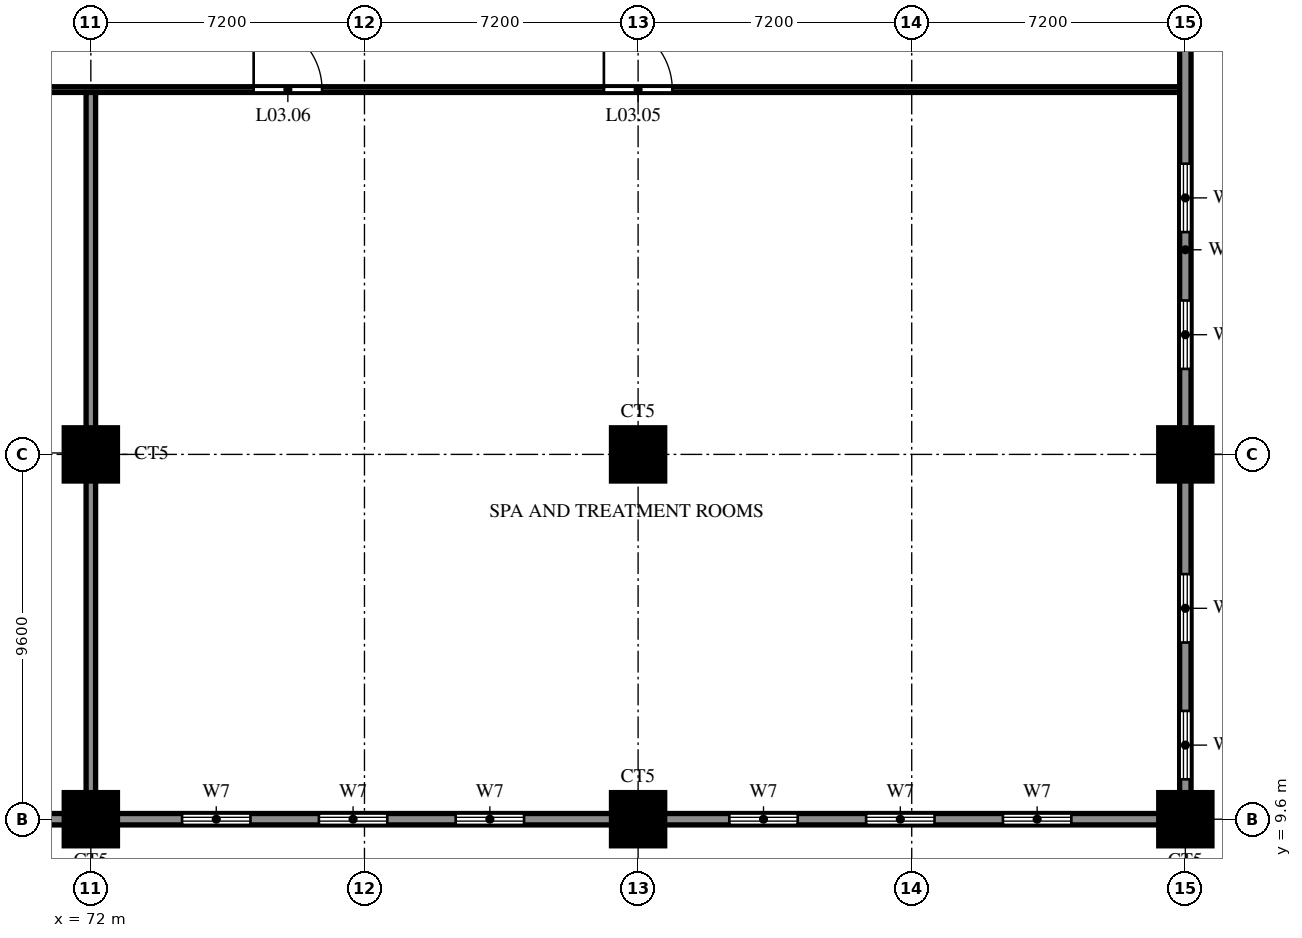
"""IFC4 building model, lengths in metres.
Left out: names, types, materials, properties, quantities, classifications, styles, units other than length and angle.
Written with IfcOpenShell. Run it as: python <this file> out.ifc"""

import sys

from ifc_helpers import new_model, si_unit, direction, frame, frame_2d, origin, origin_2d, place, context, subcontext, project, spatial, rectangle, circle, extrude, source, transform, mapped, element, fill, save


model = new_model("IFC4")
c1 = context("Model", 3, precision=1e-05, world=origin(), true_north=direction((0.0, 1.0)))
c2 = subcontext(c1, "Body", "Model", "MODEL_VIEW")
j1 = project(units=[si_unit("LENGTHUNIT", "METRE"), si_unit("PLANEANGLEUNIT", "RADIAN")], contexts=[c1])
p1 = place(None, origin())
s1 = spatial("IfcSite", under=j1, at=p1, CompositionType="ELEMENT")
p2 = place(p1, origin())
s2 = spatial("IfcBuilding", under=s1, at=p2, CompositionType="ELEMENT")
p3 = place(p2, frame((0.0, 0.0, 17.4)))
s3 = spatial("IfcBuildingStorey", under=s2, at=p3, CompositionType="ELEMENT", Elevation=17.4)
m1 = source(origin(), c2, "Body", "SweptSolid", [
    extrude(circle(Radius=0.7, at=origin_2d()), origin(), (0.0, 0.0, 1.0), 3.8),
])
for number, where, z_axis, x_axis in (
    (1, (72.0, 9.6, 0.0), (0.0, 0.0, 1.0), (1.0, 0.0, 0.0)),
    (2, (86.4, 9.6, 0.0), (0.0, 0.0, 1.0), (1.0, 0.0, 0.0)),
    (3, (100.8, 9.6, 0.0), (0.0, 0.0, 1.0), (1.0, 0.0, 0.0)),
    (4, (72.0, 19.2, 0.0), (0.0, 0.0, 1.0), (1.0, 0.0, 0.0)),
    (5, (86.4, 19.2, 0.0), (0.0, 0.0, 1.0), (1.0, 0.0, 0.0)),
    (6, (100.8, 19.2, 0.0), (0.0, 0.0, 1.0), (1.0, 0.0, 0.0)),
):
    element("IfcColumn", number, at=place(p3, frame(where, z_axis=z_axis, x_axis=x_axis)), inside=s3, PredefinedType="COLUMN", context=c2, shape_type="MappedRepresentation", body=[
        mapped(m1, transform((0.0, 0.0, 0.0))),
    ])
p4 = place(p3, frame((0.0, 9.6, 0.0), z_axis=(0.0, 0.0, 1.0), x_axis=(1.0, 0.0, 0.0)))
e7 = element("IfcWall", 7, at=p4, inside=s3, PredefinedType="SOLIDWALL", context=c2, shape_type="SweptSolid", body=[
    extrude(rectangle(XDim=100.8, YDim=0.3, at=frame_2d((50.4, 0.0))), origin(), (0.0, 0.0, 1.0), 3.8),
])
p5 = place(p4, frame((2.4, 0.0, 0.6)))
e8 = element("IfcOpeningElement", 8, at=p5, cuts=e7, PredefinedType="OPENING", context=c2, shape_type="SweptSolid", body=[
    extrude(rectangle(XDim=1.8, YDim=2.4, at=frame_2d((0.9, 1.2))), frame((0.0, 0.16, 0.0), z_axis=(0.0, -1.0, 0.0), x_axis=(1.0, 0.0, 0.0)), (0.0, 0.0, 1.0), 0.32),
])
p6 = place(p4, frame((6.0, 0.0, 0.6)))
e9 = element("IfcOpeningElement", 9, at=p6, cuts=e7, PredefinedType="OPENING", context=c2, shape_type="SweptSolid", body=[
    extrude(rectangle(XDim=1.8, YDim=2.4, at=frame_2d((0.9, 1.2))), frame((0.0, 0.16, 0.0), z_axis=(0.0, -1.0, 0.0), x_axis=(1.0, 0.0, 0.0)), (0.0, 0.0, 1.0), 0.32),
])
p7 = place(p4, frame((9.6, 0.0, 0.6)))
e10 = element("IfcOpeningElement", 10, at=p7, cuts=e7, PredefinedType="OPENING", context=c2, shape_type="SweptSolid", body=[
    extrude(rectangle(XDim=1.8, YDim=2.4, at=frame_2d((0.9, 1.2))), frame((0.0, 0.16, 0.0), z_axis=(0.0, -1.0, 0.0), x_axis=(1.0, 0.0, 0.0)), (0.0, 0.0, 1.0), 0.32),
])
p8 = place(p4, frame((16.8, 0.0, 0.6)))
e11 = element("IfcOpeningElement", 11, at=p8, cuts=e7, PredefinedType="OPENING", context=c2, shape_type="SweptSolid", body=[
    extrude(rectangle(XDim=1.8, YDim=2.4, at=frame_2d((0.9, 1.2))), frame((0.0, 0.16, 0.0), z_axis=(0.0, -1.0, 0.0), x_axis=(1.0, 0.0, 0.0)), (0.0, 0.0, 1.0), 0.32),
])
p9 = place(p4, frame((20.4, 0.0, 0.6)))
e12 = element("IfcOpeningElement", 12, at=p9, cuts=e7, PredefinedType="OPENING", context=c2, shape_type="SweptSolid", body=[
    extrude(rectangle(XDim=1.8, YDim=2.4, at=frame_2d((0.9, 1.2))), frame((0.0, 0.16, 0.0), z_axis=(0.0, -1.0, 0.0), x_axis=(1.0, 0.0, 0.0)), (0.0, 0.0, 1.0), 0.32),
])
p10 = place(p4, frame((24.0, 0.0, 0.6)))
e13 = element("IfcOpeningElement", 13, at=p10, cuts=e7, PredefinedType="OPENING", context=c2, shape_type="SweptSolid", body=[
    extrude(rectangle(XDim=1.8, YDim=2.4, at=frame_2d((0.9, 1.2))), frame((0.0, 0.16, 0.0), z_axis=(0.0, -1.0, 0.0), x_axis=(1.0, 0.0, 0.0)), (0.0, 0.0, 1.0), 0.32),
])
p11 = place(p4, frame((31.2, 0.0, 0.6)))
e14 = element("IfcOpeningElement", 14, at=p11, cuts=e7, PredefinedType="OPENING", context=c2, shape_type="SweptSolid", body=[
    extrude(rectangle(XDim=1.8, YDim=2.4, at=frame_2d((0.9, 1.2))), frame((0.0, 0.16, 0.0), z_axis=(0.0, -1.0, 0.0), x_axis=(1.0, 0.0, 0.0)), (0.0, 0.0, 1.0), 0.32),
])
p12 = place(p4, frame((34.8, 0.0, 0.6)))
e15 = element("IfcOpeningElement", 15, at=p12, cuts=e7, PredefinedType="OPENING", context=c2, shape_type="SweptSolid", body=[
    extrude(rectangle(XDim=1.8, YDim=2.4, at=frame_2d((0.9, 1.2))), frame((0.0, 0.16, 0.0), z_axis=(0.0, -1.0, 0.0), x_axis=(1.0, 0.0, 0.0)), (0.0, 0.0, 1.0), 0.32),
])
p13 = place(p4, frame((38.4, 0.0, 0.6)))
e16 = element("IfcOpeningElement", 16, at=p13, cuts=e7, PredefinedType="OPENING", context=c2, shape_type="SweptSolid", body=[
    extrude(rectangle(XDim=1.8, YDim=2.4, at=frame_2d((0.9, 1.2))), frame((0.0, 0.16, 0.0), z_axis=(0.0, -1.0, 0.0), x_axis=(1.0, 0.0, 0.0)), (0.0, 0.0, 1.0), 0.32),
])
p14 = place(p4, frame((45.6, 0.0, 0.6)))
e17 = element("IfcOpeningElement", 17, at=p14, cuts=e7, PredefinedType="OPENING", context=c2, shape_type="SweptSolid", body=[
    extrude(rectangle(XDim=1.8, YDim=2.4, at=frame_2d((0.9, 1.2))), frame((0.0, 0.16, 0.0), z_axis=(0.0, -1.0, 0.0), x_axis=(1.0, 0.0, 0.0)), (0.0, 0.0, 1.0), 0.32),
])
p15 = place(p4, frame((49.2, 0.0, 0.6)))
e18 = element("IfcOpeningElement", 18, at=p15, cuts=e7, PredefinedType="OPENING", context=c2, shape_type="SweptSolid", body=[
    extrude(rectangle(XDim=1.8, YDim=2.4, at=frame_2d((0.9, 1.2))), frame((0.0, 0.16, 0.0), z_axis=(0.0, -1.0, 0.0), x_axis=(1.0, 0.0, 0.0)), (0.0, 0.0, 1.0), 0.32),
])
p16 = place(p4, frame((52.8, 0.0, 0.6)))
e19 = element("IfcOpeningElement", 19, at=p16, cuts=e7, PredefinedType="OPENING", context=c2, shape_type="SweptSolid", body=[
    extrude(rectangle(XDim=1.8, YDim=2.4, at=frame_2d((0.9, 1.2))), frame((0.0, 0.16, 0.0), z_axis=(0.0, -1.0, 0.0), x_axis=(1.0, 0.0, 0.0)), (0.0, 0.0, 1.0), 0.32),
])
p17 = place(p4, frame((60.0, 0.0, 0.6)))
e20 = element("IfcOpeningElement", 20, at=p17, cuts=e7, PredefinedType="OPENING", context=c2, shape_type="SweptSolid", body=[
    extrude(rectangle(XDim=1.8, YDim=2.4, at=frame_2d((0.9, 1.2))), frame((0.0, 0.16, 0.0), z_axis=(0.0, -1.0, 0.0), x_axis=(1.0, 0.0, 0.0)), (0.0, 0.0, 1.0), 0.32),
])
p18 = place(p4, frame((63.6, 0.0, 0.6)))
e21 = element("IfcOpeningElement", 21, at=p18, cuts=e7, PredefinedType="OPENING", context=c2, shape_type="SweptSolid", body=[
    extrude(rectangle(XDim=1.8, YDim=2.4, at=frame_2d((0.9, 1.2))), frame((0.0, 0.16, 0.0), z_axis=(0.0, -1.0, 0.0), x_axis=(1.0, 0.0, 0.0)), (0.0, 0.0, 1.0), 0.32),
])
p19 = place(p4, frame((67.2, 0.0, 0.6)))
e22 = element("IfcOpeningElement", 22, at=p19, cuts=e7, PredefinedType="OPENING", context=c2, shape_type="SweptSolid", body=[
    extrude(rectangle(XDim=1.8, YDim=2.4, at=frame_2d((0.9, 1.2))), frame((0.0, 0.16, 0.0), z_axis=(0.0, -1.0, 0.0), x_axis=(1.0, 0.0, 0.0)), (0.0, 0.0, 1.0), 0.32),
])
p20 = place(p4, frame((74.4, 0.0, 0.6)))
e23 = element("IfcOpeningElement", 23, at=p20, cuts=e7, PredefinedType="OPENING", context=c2, shape_type="SweptSolid", body=[
    extrude(rectangle(XDim=1.8, YDim=2.4, at=frame_2d((0.9, 1.2))), frame((0.0, 0.16, 0.0), z_axis=(0.0, -1.0, 0.0), x_axis=(1.0, 0.0, 0.0)), (0.0, 0.0, 1.0), 0.32),
])
p21 = place(p4, frame((78.0, 0.0, 0.6)))
e24 = element("IfcOpeningElement", 24, at=p21, cuts=e7, PredefinedType="OPENING", context=c2, shape_type="SweptSolid", body=[
    extrude(rectangle(XDim=1.8, YDim=2.4, at=frame_2d((0.9, 1.2))), frame((0.0, 0.16, 0.0), z_axis=(0.0, -1.0, 0.0), x_axis=(1.0, 0.0, 0.0)), (0.0, 0.0, 1.0), 0.32),
])
p22 = place(p4, frame((81.6, 0.0, 0.6)))
e25 = element("IfcOpeningElement", 25, at=p22, cuts=e7, PredefinedType="OPENING", context=c2, shape_type="SweptSolid", body=[
    extrude(rectangle(XDim=1.8, YDim=2.4, at=frame_2d((0.9, 1.2))), frame((0.0, 0.16, 0.0), z_axis=(0.0, -1.0, 0.0), x_axis=(1.0, 0.0, 0.0)), (0.0, 0.0, 1.0), 0.32),
])
p23 = place(p4, frame((88.8, 0.0, 0.6)))
e26 = element("IfcOpeningElement", 26, at=p23, cuts=e7, PredefinedType="OPENING", context=c2, shape_type="SweptSolid", body=[
    extrude(rectangle(XDim=1.8, YDim=2.4, at=frame_2d((0.9, 1.2))), frame((0.0, 0.16, 0.0), z_axis=(0.0, -1.0, 0.0), x_axis=(1.0, 0.0, 0.0)), (0.0, 0.0, 1.0), 0.32),
])
p24 = place(p4, frame((92.4, 0.0, 0.6)))
e27 = element("IfcOpeningElement", 27, at=p24, cuts=e7, PredefinedType="OPENING", context=c2, shape_type="SweptSolid", body=[
    extrude(rectangle(XDim=1.8, YDim=2.4, at=frame_2d((0.9, 1.2))), frame((0.0, 0.16, 0.0), z_axis=(0.0, -1.0, 0.0), x_axis=(1.0, 0.0, 0.0)), (0.0, 0.0, 1.0), 0.32),
])
p25 = place(p4, frame((96.0, 0.0, 0.6)))
e28 = element("IfcOpeningElement", 28, at=p25, cuts=e7, PredefinedType="OPENING", context=c2, shape_type="SweptSolid", body=[
    extrude(rectangle(XDim=1.8, YDim=2.4, at=frame_2d((0.9, 1.2))), frame((0.0, 0.16, 0.0), z_axis=(0.0, -1.0, 0.0), x_axis=(1.0, 0.0, 0.0)), (0.0, 0.0, 1.0), 0.32),
])
p26 = place(p3, frame((0.15, 28.8, 0.0), z_axis=(0.0, 0.0, 1.0), x_axis=(1.0, 0.0, 0.0)))
e29 = element("IfcWall", 29, at=p26, inside=s3, PredefinedType="PARTITIONING", context=c2, shape_type="SweptSolid", body=[
    extrude(rectangle(XDim=100.5, YDim=0.15, at=frame_2d((50.25, 0.0))), origin(), (0.0, 0.0, 1.0), 2.6),
])
p27 = place(p26, frame((13.35, 0.0, 0.0)))
e30 = element("IfcOpeningElement", 30, at=p27, cuts=e29, PredefinedType="OPENING", context=c2, shape_type="SweptSolid", body=[
    extrude(rectangle(XDim=1.8, YDim=2.1, at=frame_2d((0.9, 1.05))), frame((0.0, 0.085, 0.0), z_axis=(0.0, -1.0, 0.0), x_axis=(1.0, 0.0, 0.0)), (0.0, 0.0, 1.0), 0.17),
])
p28 = place(p26, frame((4.134, 0.0, 0.0)))
e31 = element("IfcOpeningElement", 31, at=p28, cuts=e29, PredefinedType="OPENING", context=c2, shape_type="SweptSolid", body=[
    extrude(rectangle(XDim=1.8, YDim=2.1, at=frame_2d((0.9, 1.05))), frame((0.0, 0.085, 0.0), z_axis=(0.0, -1.0, 0.0), x_axis=(1.0, 0.0, 0.0)), (0.0, 0.0, 1.0), 0.17),
])
p29 = place(p26, frame((49.35, 0.0, 0.0)))
e32 = element("IfcOpeningElement", 32, at=p29, cuts=e29, PredefinedType="OPENING", context=c2, shape_type="SweptSolid", body=[
    extrude(rectangle(XDim=1.8, YDim=2.1, at=frame_2d((0.9, 1.05))), frame((0.0, 0.085, 0.0), z_axis=(0.0, -1.0, 0.0), x_axis=(1.0, 0.0, 0.0)), (0.0, 0.0, 1.0), 0.17),
])
p30 = place(p26, frame((35.526, 0.0, 0.0)))
e33 = element("IfcOpeningElement", 33, at=p30, cuts=e29, PredefinedType="OPENING", context=c2, shape_type="SweptSolid", body=[
    extrude(rectangle(XDim=1.8, YDim=2.1, at=frame_2d((0.9, 1.05))), frame((0.0, 0.085, 0.0), z_axis=(0.0, -1.0, 0.0), x_axis=(1.0, 0.0, 0.0)), (0.0, 0.0, 1.0), 0.17),
])
p31 = place(p26, frame((85.35, 0.0, 0.0)))
e34 = element("IfcOpeningElement", 34, at=p31, cuts=e29, PredefinedType="OPENING", context=c2, shape_type="SweptSolid", body=[
    extrude(rectangle(XDim=1.8, YDim=2.1, at=frame_2d((0.9, 1.05))), frame((0.0, 0.085, 0.0), z_axis=(0.0, -1.0, 0.0), x_axis=(1.0, 0.0, 0.0)), (0.0, 0.0, 1.0), 0.17),
])
p32 = place(p26, frame((76.134, 0.0, 0.0)))
e35 = element("IfcOpeningElement", 35, at=p32, cuts=e29, PredefinedType="OPENING", context=c2, shape_type="SweptSolid", body=[
    extrude(rectangle(XDim=1.8, YDim=2.1, at=frame_2d((0.9, 1.05))), frame((0.0, 0.085, 0.0), z_axis=(0.0, -1.0, 0.0), x_axis=(1.0, 0.0, 0.0)), (0.0, 0.0, 1.0), 0.17),
])
p33 = place(p3, frame((72.0, 9.75, 0.0), z_axis=(0.0, 0.0, 1.0), x_axis=(0.0, 1.0, 0.0)))
e36 = element("IfcWall", 36, at=p33, inside=s3, PredefinedType="SOLIDWALL", context=c2, shape_type="SweptSolid", body=[
    extrude(rectangle(XDim=18.975, YDim=0.25, at=frame_2d((9.488, 0.0))), origin(), (0.0, 0.0, 1.0), 2.6),
])
p34 = place(p3, frame((100.8, 9.6, 0.0), z_axis=(0.0, 0.0, 1.0), x_axis=(0.0, 1.0, 0.0)))
e37 = element("IfcWall", 37, at=p34, inside=s3, PredefinedType="SOLIDWALL", context=c2, shape_type="SweptSolid", body=[
    extrude(rectangle(XDim=33.3, YDim=0.3, at=frame_2d((16.65, 0.0))), origin(), (0.0, 0.0, 1.0), 3.8),
])
p35 = place(p34, frame((1.05, 0.0, 0.6)))
e38 = element("IfcOpeningElement", 38, at=p35, cuts=e37, PredefinedType="OPENING", context=c2, shape_type="SweptSolid", body=[
    extrude(rectangle(XDim=1.8, YDim=2.4, at=frame_2d((0.9, 1.2))), frame((0.0, 0.16, 0.0), z_axis=(0.0, -1.0, 0.0), x_axis=(1.0, 0.0, 0.0)), (0.0, 0.0, 1.0), 0.32),
])
p36 = place(p34, frame((4.65, 0.0, 0.6)))
e39 = element("IfcOpeningElement", 39, at=p36, cuts=e37, PredefinedType="OPENING", context=c2, shape_type="SweptSolid", body=[
    extrude(rectangle(XDim=1.8, YDim=2.4, at=frame_2d((0.9, 1.2))), frame((0.0, 0.16, 0.0), z_axis=(0.0, -1.0, 0.0), x_axis=(1.0, 0.0, 0.0)), (0.0, 0.0, 1.0), 0.32),
])
p37 = place(p34, frame((11.85, 0.0, 0.6)))
e40 = element("IfcOpeningElement", 40, at=p37, cuts=e37, PredefinedType="OPENING", context=c2, shape_type="SweptSolid", body=[
    extrude(rectangle(XDim=1.8, YDim=2.4, at=frame_2d((0.9, 1.2))), frame((0.0, 0.16, 0.0), z_axis=(0.0, -1.0, 0.0), x_axis=(1.0, 0.0, 0.0)), (0.0, 0.0, 1.0), 0.32),
])
p38 = place(p34, frame((15.45, 0.0, 0.6)))
e41 = element("IfcOpeningElement", 41, at=p38, cuts=e37, PredefinedType="OPENING", context=c2, shape_type="SweptSolid", body=[
    extrude(rectangle(XDim=1.8, YDim=2.4, at=frame_2d((0.9, 1.2))), frame((0.0, 0.16, 0.0), z_axis=(0.0, -1.0, 0.0), x_axis=(1.0, 0.0, 0.0)), (0.0, 0.0, 1.0), 0.32),
])
p39 = place(p34, frame((26.25, 0.0, 0.6)))
e42 = element("IfcOpeningElement", 42, at=p39, cuts=e37, PredefinedType="OPENING", context=c2, shape_type="SweptSolid", body=[
    extrude(rectangle(XDim=1.8, YDim=2.4, at=frame_2d((0.9, 1.2))), frame((0.0, 0.16, 0.0), z_axis=(0.0, -1.0, 0.0), x_axis=(1.0, 0.0, 0.0)), (0.0, 0.0, 1.0), 0.32),
])
p40 = place(p34, frame((29.85, 0.0, 0.6)))
e43 = element("IfcOpeningElement", 43, at=p40, cuts=e37, PredefinedType="OPENING", context=c2, shape_type="SweptSolid", body=[
    extrude(rectangle(XDim=1.8, YDim=2.4, at=frame_2d((0.9, 1.2))), frame((0.0, 0.16, 0.0), z_axis=(0.0, -1.0, 0.0), x_axis=(1.0, 0.0, 0.0)), (0.0, 0.0, 1.0), 0.32),
])
p41 = place(p31, origin())
e44 = element("IfcDoor", 44, at=p41, inside=s3, OperationType="DOUBLE_DOOR_SINGLE_SWING", PredefinedType="DOOR", context=c2, shape_type="SweptSolid", body=[
    extrude(rectangle(XDim=1.8, YDim=2.1, at=frame_2d((0.9, 1.05))), frame((0.0, 0.025, 0.0), z_axis=(0.0, -1.0, 0.0), x_axis=(1.0, 0.0, 0.0)), (0.0, 0.0, 1.0), 0.05),
])
fill(e34, e44)
p42 = place(p32, origin())
e45 = element("IfcDoor", 45, at=p42, inside=s3, OperationType="DOUBLE_DOOR_SINGLE_SWING", PredefinedType="DOOR", context=c2, shape_type="SweptSolid", body=[
    extrude(rectangle(XDim=1.8, YDim=2.1, at=frame_2d((0.9, 1.05))), frame((0.0, 0.025, 0.0), z_axis=(0.0, -1.0, 0.0), x_axis=(1.0, 0.0, 0.0)), (0.0, 0.0, 1.0), 0.05),
])
fill(e35, e45)
p43 = place(p20, origin())
e46 = element("IfcWindow", 46, at=p43, inside=s3, PartitioningType="DOUBLE_PANEL_VERTICAL", PredefinedType="WINDOW", context=c2, shape_type="SweptSolid", body=[
    extrude(rectangle(XDim=1.8, YDim=2.4, at=frame_2d((0.9, 1.2))), frame((0.0, 0.03, 0.0), z_axis=(0.0, -1.0, 0.0), x_axis=(1.0, 0.0, 0.0)), (0.0, 0.0, 1.0), 0.06),
])
fill(e23, e46)
p44 = place(p21, origin())
e47 = element("IfcWindow", 47, at=p44, inside=s3, PartitioningType="DOUBLE_PANEL_VERTICAL", PredefinedType="WINDOW", context=c2, shape_type="SweptSolid", body=[
    extrude(rectangle(XDim=1.8, YDim=2.4, at=frame_2d((0.9, 1.2))), frame((0.0, 0.03, 0.0), z_axis=(0.0, -1.0, 0.0), x_axis=(1.0, 0.0, 0.0)), (0.0, 0.0, 1.0), 0.06),
])
fill(e24, e47)
p45 = place(p22, origin())
e48 = element("IfcWindow", 48, at=p45, inside=s3, PartitioningType="DOUBLE_PANEL_VERTICAL", PredefinedType="WINDOW", context=c2, shape_type="SweptSolid", body=[
    extrude(rectangle(XDim=1.8, YDim=2.4, at=frame_2d((0.9, 1.2))), frame((0.0, 0.03, 0.0), z_axis=(0.0, -1.0, 0.0), x_axis=(1.0, 0.0, 0.0)), (0.0, 0.0, 1.0), 0.06),
])
fill(e25, e48)
p46 = place(p23, origin())
e49 = element("IfcWindow", 49, at=p46, inside=s3, PartitioningType="DOUBLE_PANEL_VERTICAL", PredefinedType="WINDOW", context=c2, shape_type="SweptSolid", body=[
    extrude(rectangle(XDim=1.8, YDim=2.4, at=frame_2d((0.9, 1.2))), frame((0.0, 0.03, 0.0), z_axis=(0.0, -1.0, 0.0), x_axis=(1.0, 0.0, 0.0)), (0.0, 0.0, 1.0), 0.06),
])
fill(e26, e49)
p47 = place(p24, origin())
e50 = element("IfcWindow", 50, at=p47, inside=s3, PartitioningType="DOUBLE_PANEL_VERTICAL", PredefinedType="WINDOW", context=c2, shape_type="SweptSolid", body=[
    extrude(rectangle(XDim=1.8, YDim=2.4, at=frame_2d((0.9, 1.2))), frame((0.0, 0.03, 0.0), z_axis=(0.0, -1.0, 0.0), x_axis=(1.0, 0.0, 0.0)), (0.0, 0.0, 1.0), 0.06),
])
fill(e27, e50)
p48 = place(p25, origin())
e51 = element("IfcWindow", 51, at=p48, inside=s3, PartitioningType="DOUBLE_PANEL_VERTICAL", PredefinedType="WINDOW", context=c2, shape_type="SweptSolid", body=[
    extrude(rectangle(XDim=1.8, YDim=2.4, at=frame_2d((0.9, 1.2))), frame((0.0, 0.03, 0.0), z_axis=(0.0, -1.0, 0.0), x_axis=(1.0, 0.0, 0.0)), (0.0, 0.0, 1.0), 0.06),
])
fill(e28, e51)
p49 = place(p35, origin())
e52 = element("IfcWindow", 52, at=p49, inside=s3, PartitioningType="DOUBLE_PANEL_VERTICAL", PredefinedType="WINDOW", context=c2, shape_type="SweptSolid", body=[
    extrude(rectangle(XDim=1.8, YDim=2.4, at=frame_2d((0.9, 1.2))), frame((0.0, 0.03, 0.0), z_axis=(0.0, -1.0, 0.0), x_axis=(1.0, 0.0, 0.0)), (0.0, 0.0, 1.0), 0.06),
])
fill(e38, e52)
p50 = place(p36, origin())
e53 = element("IfcWindow", 53, at=p50, inside=s3, PartitioningType="DOUBLE_PANEL_VERTICAL", PredefinedType="WINDOW", context=c2, shape_type="SweptSolid", body=[
    extrude(rectangle(XDim=1.8, YDim=2.4, at=frame_2d((0.9, 1.2))), frame((0.0, 0.03, 0.0), z_axis=(0.0, -1.0, 0.0), x_axis=(1.0, 0.0, 0.0)), (0.0, 0.0, 1.0), 0.06),
])
fill(e39, e53)
p51 = place(p37, origin())
e54 = element("IfcWindow", 54, at=p51, inside=s3, PartitioningType="DOUBLE_PANEL_VERTICAL", PredefinedType="WINDOW", context=c2, shape_type="SweptSolid", body=[
    extrude(rectangle(XDim=1.8, YDim=2.4, at=frame_2d((0.9, 1.2))), frame((0.0, 0.03, 0.0), z_axis=(0.0, -1.0, 0.0), x_axis=(1.0, 0.0, 0.0)), (0.0, 0.0, 1.0), 0.06),
])
fill(e40, e54)
p52 = place(p38, origin())
e55 = element("IfcWindow", 55, at=p52, inside=s3, PartitioningType="DOUBLE_PANEL_VERTICAL", PredefinedType="WINDOW", context=c2, shape_type="SweptSolid", body=[
    extrude(rectangle(XDim=1.8, YDim=2.4, at=frame_2d((0.9, 1.2))), frame((0.0, 0.03, 0.0), z_axis=(0.0, -1.0, 0.0), x_axis=(1.0, 0.0, 0.0)), (0.0, 0.0, 1.0), 0.06),
])
fill(e41, e55)
save(model, sys.argv[1])
